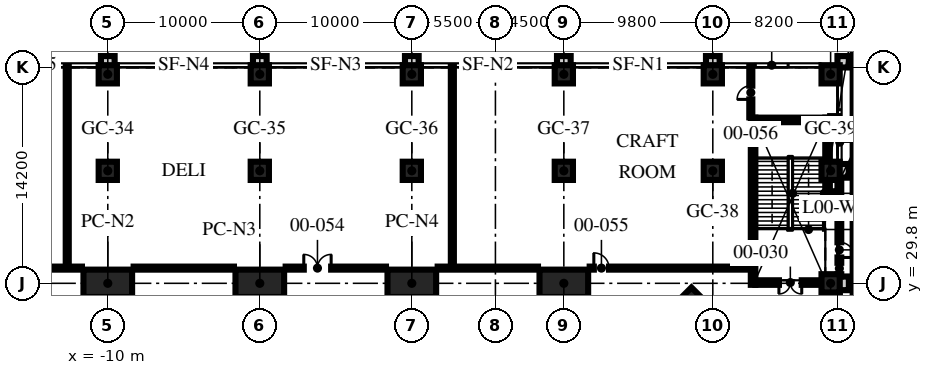
"""IFC4 building model, lengths in metres.
Left out: names, types, materials, properties, quantities, classifications, styles, units other than length and angle.
Written with IfcOpenShell. Run it as: python <this file> out.ifc"""

import sys

from ifc_helpers import new_model, si_unit, direction, frame, frame_2d, origin, origin_2d, place, context, subcontext, project, spatial, rectangle, hollow_rectangle, extrude, element, fill, save


model = new_model("IFC4")
c1 = context("Model", 3, precision=1e-05, world=origin(), true_north=direction((0.0, 1.0)))
c2 = subcontext(c1, "Body", "Model", "MODEL_VIEW")
j1 = project(units=[si_unit("LENGTHUNIT", "METRE"), si_unit("PLANEANGLEUNIT", "RADIAN")], contexts=[c1])
p1 = place(None, origin())
s1 = spatial("IfcSite", under=j1, at=p1, CompositionType="ELEMENT")
p2 = place(p1, origin())
s2 = spatial("IfcBuilding", under=s1, at=p2, CompositionType="ELEMENT")
p3 = place(p2, origin())
s3 = spatial("IfcBuildingStorey", under=s2, at=p3, CompositionType="ELEMENT", Elevation=0.0)
for number, where, z_axis, x_axis in (
    (1, (-10.0, 29.8, 0.0), (0.0, 0.0, 1.0), (1.0, 0.0, 0.0)),
    (2, (0.0, 29.8, 0.0), (0.0, 0.0, 1.0), (1.0, 0.0, 0.0)),
    (3, (10.0, 29.8, 0.0), (0.0, 0.0, 1.0), (1.0, 0.0, 0.0)),
    (4, (20.0, 29.8, 0.0), (0.0, 0.0, 1.0), (1.0, 0.0, 0.0)),
):
    element("IfcColumn", number, at=place(p3, frame(where, z_axis=z_axis, x_axis=x_axis)), inside=s3, PredefinedType="COLUMN", context=c2, shape_type="SweptSolid", body=[
        extrude(hollow_rectangle(XDim=3.2, YDim=1.8, WallThickness=0.2, at=origin_2d()), origin(), (0.0, 0.0, 1.0), 6.0),
    ])
p4 = place(p3, frame((28.394, 28.394, 0.0), z_axis=(0.0, 0.0, 1.0), x_axis=(0.707106781187, -0.707106781187, 0.0)))
e5 = element("IfcColumn", 5, at=p4, inside=s3, PredefinedType="COLUMN", context=c2, shape_type="SweptSolid", body=[
    extrude(hollow_rectangle(XDim=1.6, YDim=1.6, WallThickness=0.1, at=origin_2d()), origin(), (0.0, 0.0, 1.0), 6.0),
])
for number, where, z_axis, x_axis in (
    (6, (37.55, 29.8, 0.0), (0.0, 0.0, 1.0), (1.0, 0.0, 0.0)),
    (7, (-10.0, 37.2, 0.0), (0.0, 0.0, 1.0), (1.0, 0.0, 0.0)),
    (8, (0.0, 37.2, 0.0), (0.0, 0.0, 1.0), (1.0, 0.0, 0.0)),
    (9, (10.0, 37.2, 0.0), (0.0, 0.0, 1.0), (1.0, 0.0, 0.0)),
    (10, (20.0, 37.2, 0.0), (0.0, 0.0, 1.0), (1.0, 0.0, 0.0)),
    (11, (29.8, 37.2, 0.0), (0.0, 0.0, 1.0), (1.0, 0.0, 0.0)),
    (12, (37.55, 37.2, 0.0), (0.0, 0.0, 1.0), (1.0, 0.0, 0.0)),
    (13, (-10.0, 43.55, 0.0), (0.0, 0.0, 1.0), (1.0, 0.0, 0.0)),
    (14, (0.0, 43.55, 0.0), (0.0, 0.0, 1.0), (1.0, 0.0, 0.0)),
    (15, (10.0, 43.55, 0.0), (0.0, 0.0, 1.0), (1.0, 0.0, 0.0)),
    (16, (20.0, 43.55, 0.0), (0.0, 0.0, 1.0), (1.0, 0.0, 0.0)),
    (17, (29.8, 43.55, 0.0), (0.0, 0.0, 1.0), (1.0, 0.0, 0.0)),
    (18, (37.55, 43.55, 0.0), (0.0, 0.0, 1.0), (1.0, 0.0, 0.0)),
):
    element("IfcColumn", number, at=place(p3, frame(where, z_axis=z_axis, x_axis=x_axis)), inside=s3, PredefinedType="COLUMN", context=c2, shape_type="SweptSolid", body=[
        extrude(rectangle(XDim=1.2, YDim=1.2, at=origin_2d()), origin(), (0.0, 0.0, 1.0), 6.0),
    ])
for number, where, z_axis, x_axis in (
    (19, (38.375, 29.35, -0.2), (0.0, 0.0, 1.0), (0.0, 1.0, 0.0)),
    (20, (38.375, 36.75, -0.2), (0.0, 0.0, 1.0), (0.0, 1.0, 0.0)),
):
    element("IfcWall", number, at=place(p3, frame(where, z_axis=z_axis, x_axis=x_axis)), inside=s3, PredefinedType="SOLIDWALL", context=c2, shape_type="SweptSolid", body=[
        extrude(rectangle(XDim=0.9, YDim=0.75, at=frame_2d((0.45, 0.0))), origin(), (0.0, 0.0, 1.0), 6.2),
    ])
p5 = place(p3, frame((38.375, 44.0, -0.2), z_axis=(0.0, 0.0, 1.0), x_axis=(0.0, 1.0, 0.0)))
e21 = element("IfcWall", 21, at=p5, inside=s3, PredefinedType="SOLIDWALL", context=c2, shape_type="SweptSolid", body=[
    extrude(rectangle(XDim=0.75, YDim=0.75, at=frame_2d((0.375, 0.0))), origin(), (0.0, 0.0, 1.0), 6.2),
])
p6 = place(p3, frame((38.125, 30.25, -0.2), z_axis=(0.0, 0.0, 1.0), x_axis=(0.0, 1.0, 0.0)))
e22 = element("IfcWall", 22, at=p6, inside=s3, PredefinedType="SOLIDWALL", context=c2, shape_type="SweptSolid", body=[
    extrude(rectangle(XDim=6.5, YDim=0.25, at=frame_2d((3.25, 0.0))), origin(), (0.0, 0.0, 1.0), 5.6),
])
p7 = place(p6, frame((0.15, 0.0, 1.4)))
e23 = element("IfcOpeningElement", 23, at=p7, cuts=e22, PredefinedType="OPENING", context=c2, shape_type="SweptSolid", body=[
    extrude(rectangle(XDim=0.75, YDim=1.7, at=frame_2d((0.375, 0.85))), frame((0.0, 0.135, 0.0), z_axis=(0.0, -1.0, 0.0), x_axis=(1.0, 0.0, 0.0)), (0.0, 0.0, 1.0), 0.27),
])
p8 = place(p6, frame((2.25, 0.0, 0.2), z_axis=(0.0, 0.0, 1.0), x_axis=(-1.0, 0.0, 0.0)))
e24 = element("IfcOpeningElement", 24, at=p8, cuts=e22, PredefinedType="OPENING", context=c2, shape_type="SweptSolid", body=[
    extrude(rectangle(XDim=1.0, YDim=2.4, at=frame_2d((0.5, 1.2))), frame((0.0, 0.135, 0.0), z_axis=(0.0, -1.0, 0.0), x_axis=(1.0, 0.0, 0.0)), (0.0, 0.0, 1.0), 0.27),
])
for number, where, z_axis, x_axis in (
    (25, (30.25, 44.375, -0.2), (0.0, 0.0, 1.0), (-1.0, 0.0, 0.0)),
    (26, (20.45, 44.375, -0.2), (0.0, 0.0, 1.0), (-1.0, 0.0, 0.0)),
    (27, (10.45, 44.375, -0.2), (0.0, 0.0, 1.0), (-1.0, 0.0, 0.0)),
    (28, (0.45, 44.375, -0.2), (0.0, 0.0, 1.0), (-1.0, 0.0, 0.0)),
    (29, (-9.55, 44.375, -0.2), (0.0, 0.0, 1.0), (-1.0, 0.0, 0.0)),
):
    element("IfcWall", number, at=place(p3, frame(where, z_axis=z_axis, x_axis=x_axis)), inside=s3, PredefinedType="SOLIDWALL", context=c2, shape_type="SweptSolid", body=[
        extrude(rectangle(XDim=0.9, YDim=0.75, at=frame_2d((0.45, 0.0))), origin(), (0.0, 0.0, 1.0), 6.2),
    ])
p9 = place(p3, frame((37.35, 35.556, 0.0), z_axis=(0.0, 0.0, 1.0), x_axis=(0.0, 1.0, 0.0)))
e30 = element("IfcWall", 30, at=p9, inside=s3, PredefinedType="SOLIDWALL", context=c2, shape_type="SweptSolid", body=[
    extrude(rectangle(XDim=5.144, YDim=0.3, at=frame_2d((2.572, 0.0))), origin(), (0.0, 0.0, 1.0), 5.7),
])
p10 = place(p3, frame((38.0, 35.706, 0.0), z_axis=(0.0, 0.0, 1.0), x_axis=(-1.0, 0.0, 0.0)))
e31 = element("IfcWall", 31, at=p10, inside=s3, PredefinedType="PARTITIONING", context=c2, shape_type="SweptSolid", body=[
    extrude(rectangle(XDim=0.5, YDim=0.3, at=frame_2d((0.25, 0.0))), origin(), (0.0, 0.0, 1.0), 4.27),
])
p11 = place(p3, frame((38.0, 29.85, 0.0), z_axis=(0.0, 0.0, 1.0), x_axis=(-1.0, 0.0, 0.0)))
e32 = element("IfcWall", 32, at=p11, inside=s3, PredefinedType="SOLIDWALL", context=c2, shape_type="SweptSolid", body=[
    extrude(rectangle(XDim=5.4, YDim=0.3, at=frame_2d((2.7, 0.0))), origin(), (0.0, 0.0, 1.0), 5.7),
])
p12 = place(p11, frame((2.35, 0.0, 0.0)))
e33 = element("IfcOpeningElement", 33, at=p12, cuts=e32, PredefinedType="OPENING", context=c2, shape_type="SweptSolid", body=[
    extrude(rectangle(XDim=1.5, YDim=2.1, at=frame_2d((0.75, 1.05))), frame((0.0, 0.16, 0.0), z_axis=(0.0, -1.0, 0.0), x_axis=(1.0, 0.0, 0.0)), (0.0, 0.0, 1.0), 0.32),
])
p13 = place(p3, frame((32.45, 29.7, 0.0), z_axis=(0.0, 0.0, 1.0), x_axis=(0.0, 1.0, 0.0)))
e34 = element("IfcWall", 34, at=p13, inside=s3, PredefinedType="SOLIDWALL", context=c2, shape_type="SweptSolid", body=[
    extrude(rectangle(XDim=11.0, YDim=0.3, at=frame_2d((5.5, 0.0))), origin(), (0.0, 0.0, 1.0), 5.7),
])
p14 = place(p3, frame((37.2, 40.55, 0.0), z_axis=(0.0, 0.0, 1.0), x_axis=(-1.0, 0.0, 0.0)))
e35 = element("IfcWall", 35, at=p14, inside=s3, PredefinedType="SOLIDWALL", context=c2, shape_type="SweptSolid", body=[
    extrude(rectangle(XDim=4.6, YDim=0.3, at=frame_2d((2.3, 0.0))), origin(), (0.0, 0.0, 1.0), 5.7),
])
for number, where, z_axis, x_axis in (
    (36, (-18.3, 30.8, 0.0), (0.0, 0.0, 1.0), (1.0, 0.0, 0.0)),
    (37, (-8.3, 30.8, 0.0), (0.0, 0.0, 1.0), (1.0, 0.0, 0.0)),
):
    element("IfcWall", number, at=place(p3, frame(where, z_axis=z_axis, x_axis=x_axis)), inside=s3, PredefinedType="SOLIDWALL", context=c2, shape_type="SweptSolid", body=[
        extrude(rectangle(XDim=6.6, YDim=0.2, at=frame_2d((3.3, 0.0))), origin(), (0.0, 0.0, 1.0), 5.7),
    ])
p15 = place(p3, frame((1.7, 30.8, 0.0), z_axis=(0.0, 0.0, 1.0), x_axis=(1.0, 0.0, 0.0)))
e38 = element("IfcWall", 38, at=p15, inside=s3, PredefinedType="SOLIDWALL", context=c2, shape_type="SweptSolid", body=[
    extrude(rectangle(XDim=6.6, YDim=0.2, at=frame_2d((3.3, 0.0))), origin(), (0.0, 0.0, 1.0), 5.7),
])
p16 = place(p15, frame((1.193, 0.0, 0.0)))
e39 = element("IfcOpeningElement", 39, at=p16, cuts=e38, PredefinedType="OPENING", context=c2, shape_type="SweptSolid", body=[
    extrude(rectangle(XDim=1.8, YDim=2.4, at=frame_2d((0.9, 1.2))), frame((0.0, 0.11, 0.0), z_axis=(0.0, -1.0, 0.0), x_axis=(1.0, 0.0, 0.0)), (0.0, 0.0, 1.0), 0.22),
])
p17 = place(p3, frame((11.7, 30.8, 0.0), z_axis=(0.0, 0.0, 1.0), x_axis=(1.0, 0.0, 0.0)))
e40 = element("IfcWall", 40, at=p17, inside=s3, PredefinedType="SOLIDWALL", context=c2, shape_type="SweptSolid", body=[
    extrude(rectangle(XDim=6.6, YDim=0.2, at=frame_2d((3.3, 0.0))), origin(), (0.0, 0.0, 1.0), 5.7),
])
p18 = place(p3, frame((21.7, 30.8, 0.0), z_axis=(0.0, 0.0, 1.0), x_axis=(1.0, 0.0, 0.0)))
e41 = element("IfcWall", 41, at=p18, inside=s3, PredefinedType="SOLIDWALL", context=c2, shape_type="SweptSolid", body=[
    extrude(rectangle(XDim=10.58, YDim=0.2, at=frame_2d((5.29, 0.0))), origin(), (0.0, 0.0, 1.0), 5.7),
])
p19 = place(p18, frame((0.273, 0.0, 0.0)))
e42 = element("IfcOpeningElement", 42, at=p19, cuts=e41, PredefinedType="OPENING", context=c2, shape_type="SweptSolid", body=[
    extrude(rectangle(XDim=1.0, YDim=2.1, at=frame_2d((0.5, 1.05))), frame((0.0, 0.11, 0.0), z_axis=(0.0, -1.0, 0.0), x_axis=(1.0, 0.0, 0.0)), (0.0, 0.0, 1.0), 0.22),
])
for number, where, z_axis, x_axis in (
    (43, (-12.667, 30.9, 0.0), (0.0, 0.0, 1.0), (0.0, 1.0, 0.0)),
    (44, (12.667, 30.9, 0.0), (0.0, 0.0, 1.0), (0.0, 1.0, 0.0)),
):
    element("IfcWall", number, at=place(p3, frame(where, z_axis=z_axis, x_axis=x_axis)), inside=s3, PredefinedType="SOLIDWALL", context=c2, shape_type="SweptSolid", body=[
        extrude(rectangle(XDim=13.175, YDim=0.2, at=frame_2d((6.587, 0.0))), origin(), (0.0, 0.0, 1.0), 4.7),
    ])
p20 = place(p3, frame((37.52, 40.7, 0.0), z_axis=(0.0, 0.0, 1.0), x_axis=(1.0, 0.0, 0.0)))
e45 = element("IfcWall", 45, at=p20, inside=s3, PredefinedType="SOLIDWALL", context=c2, shape_type="SweptSolid", body=[
    extrude(rectangle(XDim=0.555, YDim=0.2, at=frame_2d((0.277, 0.0))), origin(), (0.0, 0.0, 1.0), 4.27),
])
p21 = place(p3, frame((32.3, 40.72, 0.0), z_axis=(0.0, 0.0, 1.0), x_axis=(0.0, 1.0, 0.0)))
e46 = element("IfcWall", 46, at=p21, inside=s3, PredefinedType="SOLIDWALL", context=c2, shape_type="SweptSolid", body=[
    extrude(rectangle(XDim=3.355, YDim=0.2, at=frame_2d((1.677, 0.0))), origin(), (0.0, 0.0, 1.0), 4.7),
])
p22 = place(p21, frame((1.18, 0.0, 0.0)))
e47 = element("IfcOpeningElement", 47, at=p22, cuts=e46, PredefinedType="OPENING", context=c2, shape_type="SweptSolid", body=[
    extrude(rectangle(XDim=0.9, YDim=2.1, at=frame_2d((0.45, 1.05))), frame((0.0, 0.11, 0.0), z_axis=(0.0, -1.0, 0.0), x_axis=(1.0, 0.0, 0.0)), (0.0, 0.0, 1.0), 0.22),
])
p23 = place(p7, origin())
e48 = element("IfcWindow", 48, at=p23, inside=s3, PartitioningType="SINGLE_PANEL", PredefinedType="WINDOW", context=c2, shape_type="SweptSolid", body=[
    extrude(rectangle(XDim=0.75, YDim=1.7, at=frame_2d((0.375, 0.85))), frame((0.0, 0.03, 0.0), z_axis=(0.0, -1.0, 0.0), x_axis=(1.0, 0.0, 0.0)), (0.0, 0.0, 1.0), 0.06),
])
fill(e23, e48)
p24 = place(p8, origin())
e49 = element("IfcDoor", 49, at=p24, inside=s3, OperationType="SINGLE_SWING_LEFT", PredefinedType="DOOR", context=c2, shape_type="SweptSolid", body=[
    extrude(rectangle(XDim=1.0, YDim=2.4, at=frame_2d((0.5, 1.2))), frame((0.0, 0.025, 0.0), z_axis=(0.0, -1.0, 0.0), x_axis=(1.0, 0.0, 0.0)), (0.0, 0.0, 1.0), 0.05),
])
fill(e24, e49)
p25 = place(p12, origin())
e50 = element("IfcDoor", 50, at=p25, inside=s3, OperationType="DOUBLE_DOOR_SINGLE_SWING", PredefinedType="DOOR", context=c2, shape_type="SweptSolid", body=[
    extrude(rectangle(XDim=1.5, YDim=2.1, at=frame_2d((0.75, 1.05))), frame((0.0, 0.025, 0.0), z_axis=(0.0, -1.0, 0.0), x_axis=(1.0, 0.0, 0.0)), (0.0, 0.0, 1.0), 0.05),
])
fill(e33, e50)
p26 = place(p16, origin())
e51 = element("IfcDoor", 51, at=p26, inside=s3, OperationType="DOUBLE_DOOR_SINGLE_SWING", PredefinedType="DOOR", context=c2, shape_type="SweptSolid", body=[
    extrude(rectangle(XDim=1.8, YDim=2.4, at=frame_2d((0.9, 1.2))), frame((0.0, 0.025, 0.0), z_axis=(0.0, -1.0, 0.0), x_axis=(1.0, 0.0, 0.0)), (0.0, 0.0, 1.0), 0.05),
])
fill(e39, e51)
p27 = place(p19, origin())
e52 = element("IfcDoor", 52, at=p27, inside=s3, OperationType="SINGLE_SWING_LEFT", PredefinedType="DOOR", context=c2, shape_type="SweptSolid", body=[
    extrude(rectangle(XDim=1.0, YDim=2.1, at=frame_2d((0.5, 1.05))), frame((0.0, 0.025, 0.0), z_axis=(0.0, -1.0, 0.0), x_axis=(1.0, 0.0, 0.0)), (0.0, 0.0, 1.0), 0.05),
])
fill(e42, e52)
p28 = place(p22, origin())
e53 = element("IfcDoor", 53, at=p28, inside=s3, OperationType="SINGLE_SWING_LEFT", PredefinedType="DOOR", context=c2, shape_type="SweptSolid", body=[
    extrude(rectangle(XDim=0.9, YDim=2.1, at=frame_2d((0.45, 1.05))), frame((0.0, 0.025, 0.0), z_axis=(0.0, -1.0, 0.0), x_axis=(1.0, 0.0, 0.0)), (0.0, 0.0, 1.0), 0.05),
])
fill(e47, e53)
save(model, sys.argv[1])
